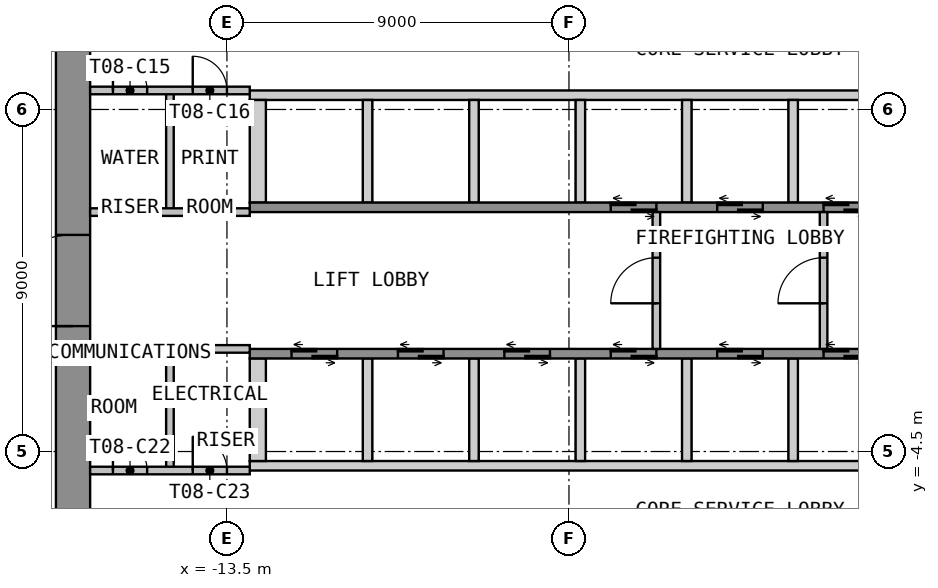
"""IFC4 building model, lengths in metres.
Left out: names, types, materials, properties, quantities, classifications, styles, units other than length and angle.
Written with IfcOpenShell. Run it as: python <this file> out.ifc"""

import sys

from ifc_helpers import new_model, si_unit, direction, frame, frame_2d, origin, place, context, subcontext, project, spatial, polyline, rectangle, outline, extrude, element, fill, save


model = new_model("IFC4")
c1 = context("Model", 3, precision=1e-05, world=origin(), true_north=direction((0.0, 1.0)))
c2 = subcontext(c1, "Body", "Model", "MODEL_VIEW")
j1 = project(units=[si_unit("LENGTHUNIT", "METRE"), si_unit("PLANEANGLEUNIT", "RADIAN")], contexts=[c1])
p1 = place(None, origin())
s1 = spatial("IfcSite", under=j1, at=p1, CompositionType="ELEMENT")
p2 = place(p1, origin())
s2 = spatial("IfcBuilding", under=s1, at=p2, CompositionType="ELEMENT")
p3 = place(p2, frame((0.0, 0.0, 116.4)))
s3 = spatial("IfcBuildingStorey", under=s2, at=p3, CompositionType="ELEMENT", Elevation=116.4)
p4 = place(p3, frame((-17.55, -12.6, 0.0), z_axis=(0.0, 0.0, 1.0), x_axis=(0.0, 1.0, 0.0)))
e1 = element("IfcWall", 1, at=p4, inside=s3, PredefinedType="SHEAR", context=c2, shape_type="SweptSolid", body=[
    extrude(rectangle(XDim=25.2, YDim=0.9, at=frame_2d((12.6, 0.0))), origin(), (0.0, 0.0, 1.0), 3.525),
])
p5 = place(p4, frame((11.4, 0.0, 0.0)))
e2 = element("IfcOpeningElement", 2, at=p5, cuts=e1, PredefinedType="OPENING", context=c2, shape_type="SweptSolid", body=[
    extrude(rectangle(XDim=2.4, YDim=2.1, at=frame_2d((1.2, 1.05))), frame((0.0, 0.46, 0.0), z_axis=(0.0, -1.0, 0.0), x_axis=(1.0, 0.0, 0.0)), (0.0, 0.0, 1.0), 0.92),
])
p6 = place(p3, origin())
e3 = element("IfcWall", 3, at=p6, inside=s3, PredefinedType="SHEAR", context=c2, shape_type="SweptSolid", body=[
    extrude(outline(polyline([(-12.9, 4.75), (12.9, 4.75), (12.9, 5.0), (-12.9, 5.0), (-12.9, 4.75)])), origin(), (0.0, 0.0, 1.0), 3.525),
])
p7 = place(p3, origin())
e4 = element("IfcWall", 4, at=p7, inside=s3, PredefinedType="SHEAR", context=c2, shape_type="SweptSolid", body=[
    extrude(outline(polyline([(-12.9, 2.05), (-12.475, 2.05), (-12.475, 4.75), (-12.9, 4.75), (-12.9, 2.05)])), origin(), (0.0, 0.0, 1.0), 3.525),
])
p8 = place(p3, origin())
e5 = element("IfcWall", 5, at=p8, inside=s3, PredefinedType="SHEAR", context=c2, shape_type="SweptSolid", body=[
    extrude(outline(polyline([(-9.925, 2.05), (-9.675, 2.05), (-9.675, 4.75), (-9.925, 4.75), (-9.925, 2.05)])), origin(), (0.0, 0.0, 1.0), 3.525),
])
p9 = place(p3, origin())
e6 = element("IfcWall", 6, at=p9, inside=s3, PredefinedType="SHEAR", context=c2, shape_type="SweptSolid", body=[
    extrude(outline(polyline([(-7.125, 2.05), (-6.875, 2.05), (-6.875, 4.75), (-7.125, 4.75), (-7.125, 2.05)])), origin(), (0.0, 0.0, 1.0), 3.525),
])
p10 = place(p3, origin())
e7 = element("IfcWall", 7, at=p10, inside=s3, PredefinedType="SHEAR", context=c2, shape_type="SweptSolid", body=[
    extrude(outline(polyline([(-4.325, 2.05), (-4.075, 2.05), (-4.075, 4.75), (-4.325, 4.75), (-4.325, 2.05)])), origin(), (0.0, 0.0, 1.0), 3.525),
])
p11 = place(p3, origin())
e8 = element("IfcWall", 8, at=p11, inside=s3, PredefinedType="SHEAR", context=c2, shape_type="SweptSolid", body=[
    extrude(outline(polyline([(-1.525, 2.05), (-1.275, 2.05), (-1.275, 4.75), (-1.525, 4.75), (-1.525, 2.05)])), origin(), (0.0, 0.0, 1.0), 3.525),
])
p12 = place(p3, origin())
e9 = element("IfcWall", 9, at=p12, inside=s3, PredefinedType="SHEAR", context=c2, shape_type="SweptSolid", body=[
    extrude(outline(polyline([(1.275, 2.05), (1.525, 2.05), (1.525, 4.75), (1.275, 4.75), (1.275, 2.05)])), origin(), (0.0, 0.0, 1.0), 3.525),
])
p13 = place(p3, frame((-12.9, 1.925, 0.0), z_axis=(0.0, 0.0, 1.0), x_axis=(1.0, 0.0, 0.0)))
e10 = element("IfcWall", 10, at=p13, inside=s3, PredefinedType="SHEAR", context=c2, shape_type="SweptSolid", body=[
    extrude(rectangle(XDim=25.8, YDim=0.25, at=frame_2d((12.9, 0.0))), origin(), (0.0, 0.0, 1.0), 3.525),
])
p14 = place(p13, frame((9.5, 0.0, 0.0)))
e11 = element("IfcOpeningElement", 11, at=p14, cuts=e10, PredefinedType="OPENING", context=c2, shape_type="SweptSolid", body=[
    extrude(rectangle(XDim=1.2, YDim=2.1, at=frame_2d((0.6, 1.05))), frame((0.0, 0.135, 0.0), z_axis=(0.0, -1.0, 0.0), x_axis=(1.0, 0.0, 0.0)), (0.0, 0.0, 1.0), 0.27),
])
p15 = place(p13, frame((12.3, 0.0, 0.0)))
e12 = element("IfcOpeningElement", 12, at=p15, cuts=e10, PredefinedType="OPENING", context=c2, shape_type="SweptSolid", body=[
    extrude(rectangle(XDim=1.2, YDim=2.1, at=frame_2d((0.6, 1.05))), frame((0.0, 0.135, 0.0), z_axis=(0.0, -1.0, 0.0), x_axis=(1.0, 0.0, 0.0)), (0.0, 0.0, 1.0), 0.27),
])
p16 = place(p13, frame((15.1, 0.0, 0.0)))
e13 = element("IfcOpeningElement", 13, at=p16, cuts=e10, PredefinedType="OPENING", context=c2, shape_type="SweptSolid", body=[
    extrude(rectangle(XDim=1.2, YDim=2.1, at=frame_2d((0.6, 1.05))), frame((0.0, 0.135, 0.0), z_axis=(0.0, -1.0, 0.0), x_axis=(1.0, 0.0, 0.0)), (0.0, 0.0, 1.0), 0.27),
])
p17 = place(p13, frame((17.9, 0.0, 0.0)))
e14 = element("IfcOpeningElement", 14, at=p17, cuts=e10, PredefinedType="OPENING", context=c2, shape_type="SweptSolid", body=[
    extrude(rectangle(XDim=1.2, YDim=2.1, at=frame_2d((0.6, 1.05))), frame((0.0, 0.135, 0.0), z_axis=(0.0, -1.0, 0.0), x_axis=(1.0, 0.0, 0.0)), (0.0, 0.0, 1.0), 0.27),
])
p18 = place(p13, frame((20.7, 0.0, 0.0)))
e15 = element("IfcOpeningElement", 15, at=p18, cuts=e10, PredefinedType="OPENING", context=c2, shape_type="SweptSolid", body=[
    extrude(rectangle(XDim=1.2, YDim=2.1, at=frame_2d((0.6, 1.05))), frame((0.0, 0.135, 0.0), z_axis=(0.0, -1.0, 0.0), x_axis=(1.0, 0.0, 0.0)), (0.0, 0.0, 1.0), 0.27),
])
p19 = place(p13, frame((23.5, 0.0, 0.0)))
e16 = element("IfcOpeningElement", 16, at=p19, cuts=e10, PredefinedType="OPENING", context=c2, shape_type="SweptSolid", body=[
    extrude(rectangle(XDim=1.2, YDim=2.1, at=frame_2d((0.6, 1.05))), frame((0.0, 0.135, 0.0), z_axis=(0.0, -1.0, 0.0), x_axis=(1.0, 0.0, 0.0)), (0.0, 0.0, 1.0), 0.27),
])
p20 = place(p3, origin())
e17 = element("IfcWall", 17, at=p20, inside=s3, PredefinedType="SHEAR", context=c2, shape_type="SweptSolid", body=[
    extrude(outline(polyline([(-12.9, -5.0), (12.9, -5.0), (12.9, -4.75), (-12.9, -4.75), (-12.9, -5.0)])), origin(), (0.0, 0.0, 1.0), 3.525),
])
p21 = place(p3, origin())
e18 = element("IfcWall", 18, at=p21, inside=s3, PredefinedType="SHEAR", context=c2, shape_type="SweptSolid", body=[
    extrude(outline(polyline([(-12.9, -4.75), (-12.475, -4.75), (-12.475, -2.05), (-12.9, -2.05), (-12.9, -4.75)])), origin(), (0.0, 0.0, 1.0), 3.525),
])
p22 = place(p3, origin())
e19 = element("IfcWall", 19, at=p22, inside=s3, PredefinedType="SHEAR", context=c2, shape_type="SweptSolid", body=[
    extrude(outline(polyline([(-9.925, -4.75), (-9.675, -4.75), (-9.675, -2.05), (-9.925, -2.05), (-9.925, -4.75)])), origin(), (0.0, 0.0, 1.0), 3.525),
])
p23 = place(p3, origin())
e20 = element("IfcWall", 20, at=p23, inside=s3, PredefinedType="SHEAR", context=c2, shape_type="SweptSolid", body=[
    extrude(outline(polyline([(-7.125, -4.75), (-6.875, -4.75), (-6.875, -2.05), (-7.125, -2.05), (-7.125, -4.75)])), origin(), (0.0, 0.0, 1.0), 3.525),
])
p24 = place(p3, origin())
e21 = element("IfcWall", 21, at=p24, inside=s3, PredefinedType="SHEAR", context=c2, shape_type="SweptSolid", body=[
    extrude(outline(polyline([(-4.325, -4.75), (-4.075, -4.75), (-4.075, -2.05), (-4.325, -2.05), (-4.325, -4.75)])), origin(), (0.0, 0.0, 1.0), 3.525),
])
p25 = place(p3, origin())
e22 = element("IfcWall", 22, at=p25, inside=s3, PredefinedType="SHEAR", context=c2, shape_type="SweptSolid", body=[
    extrude(outline(polyline([(-1.525, -4.75), (-1.275, -4.75), (-1.275, -2.05), (-1.525, -2.05), (-1.525, -4.75)])), origin(), (0.0, 0.0, 1.0), 3.525),
])
p26 = place(p3, origin())
e23 = element("IfcWall", 23, at=p26, inside=s3, PredefinedType="SHEAR", context=c2, shape_type="SweptSolid", body=[
    extrude(outline(polyline([(1.275, -4.75), (1.525, -4.75), (1.525, -2.05), (1.275, -2.05), (1.275, -4.75)])), origin(), (0.0, 0.0, 1.0), 3.525),
])
p27 = place(p3, frame((-12.9, -1.925, 0.0), z_axis=(0.0, 0.0, 1.0), x_axis=(1.0, 0.0, 0.0)))
e24 = element("IfcWall", 24, at=p27, inside=s3, PredefinedType="SHEAR", context=c2, shape_type="SweptSolid", body=[
    extrude(rectangle(XDim=25.8, YDim=0.25, at=frame_2d((12.9, 0.0))), origin(), (0.0, 0.0, 1.0), 3.525),
])
p28 = place(p27, frame((1.1, 0.0, 0.0)))
e25 = element("IfcOpeningElement", 25, at=p28, cuts=e24, PredefinedType="OPENING", context=c2, shape_type="SweptSolid", body=[
    extrude(rectangle(XDim=1.2, YDim=2.1, at=frame_2d((0.6, 1.05))), frame((0.0, 0.135, 0.0), z_axis=(0.0, -1.0, 0.0), x_axis=(1.0, 0.0, 0.0)), (0.0, 0.0, 1.0), 0.27),
])
p29 = place(p27, frame((3.9, 0.0, 0.0)))
e26 = element("IfcOpeningElement", 26, at=p29, cuts=e24, PredefinedType="OPENING", context=c2, shape_type="SweptSolid", body=[
    extrude(rectangle(XDim=1.2, YDim=2.1, at=frame_2d((0.6, 1.05))), frame((0.0, 0.135, 0.0), z_axis=(0.0, -1.0, 0.0), x_axis=(1.0, 0.0, 0.0)), (0.0, 0.0, 1.0), 0.27),
])
p30 = place(p27, frame((6.7, 0.0, 0.0)))
e27 = element("IfcOpeningElement", 27, at=p30, cuts=e24, PredefinedType="OPENING", context=c2, shape_type="SweptSolid", body=[
    extrude(rectangle(XDim=1.2, YDim=2.1, at=frame_2d((0.6, 1.05))), frame((0.0, 0.135, 0.0), z_axis=(0.0, -1.0, 0.0), x_axis=(1.0, 0.0, 0.0)), (0.0, 0.0, 1.0), 0.27),
])
p31 = place(p27, frame((9.5, 0.0, 0.0)))
e28 = element("IfcOpeningElement", 28, at=p31, cuts=e24, PredefinedType="OPENING", context=c2, shape_type="SweptSolid", body=[
    extrude(rectangle(XDim=1.2, YDim=2.1, at=frame_2d((0.6, 1.05))), frame((0.0, 0.135, 0.0), z_axis=(0.0, -1.0, 0.0), x_axis=(1.0, 0.0, 0.0)), (0.0, 0.0, 1.0), 0.27),
])
p32 = place(p27, frame((12.3, 0.0, 0.0)))
e29 = element("IfcOpeningElement", 29, at=p32, cuts=e24, PredefinedType="OPENING", context=c2, shape_type="SweptSolid", body=[
    extrude(rectangle(XDim=1.2, YDim=2.1, at=frame_2d((0.6, 1.05))), frame((0.0, 0.135, 0.0), z_axis=(0.0, -1.0, 0.0), x_axis=(1.0, 0.0, 0.0)), (0.0, 0.0, 1.0), 0.27),
])
p33 = place(p27, frame((15.1, 0.0, 0.0)))
e30 = element("IfcOpeningElement", 30, at=p33, cuts=e24, PredefinedType="OPENING", context=c2, shape_type="SweptSolid", body=[
    extrude(rectangle(XDim=1.2, YDim=2.1, at=frame_2d((0.6, 1.05))), frame((0.0, 0.135, 0.0), z_axis=(0.0, -1.0, 0.0), x_axis=(1.0, 0.0, 0.0)), (0.0, 0.0, 1.0), 0.27),
])
p34 = place(p3, frame((-2.2, -1.8, 0.0), z_axis=(0.0, 0.0, 1.0), x_axis=(0.0, 1.0, 0.0)))
e31 = element("IfcWall", 31, at=p34, inside=s3, PredefinedType="PARTITIONING", context=c2, shape_type="SweptSolid", body=[
    extrude(rectangle(XDim=3.6, YDim=0.2, at=frame_2d((1.8, 0.0))), origin(), (0.0, 0.0, 1.0), 3.525),
])
p35 = place(p34, frame((1.2, 0.0, 0.0)))
e32 = element("IfcOpeningElement", 32, at=p35, cuts=e31, PredefinedType="OPENING", context=c2, shape_type="SweptSolid", body=[
    extrude(rectangle(XDim=1.2, YDim=2.1, at=frame_2d((0.6, 1.05))), frame((0.0, 0.11, 0.0), z_axis=(0.0, -1.0, 0.0), x_axis=(1.0, 0.0, 0.0)), (0.0, 0.0, 1.0), 0.22),
])
p36 = place(p3, frame((2.2, -1.8, 0.0), z_axis=(0.0, 0.0, 1.0), x_axis=(0.0, 1.0, 0.0)))
e33 = element("IfcWall", 33, at=p36, inside=s3, PredefinedType="PARTITIONING", context=c2, shape_type="SweptSolid", body=[
    extrude(rectangle(XDim=3.6, YDim=0.2, at=frame_2d((1.8, 0.0))), origin(), (0.0, 0.0, 1.0), 3.525),
])
p37 = place(p36, frame((1.2, 0.0, 0.0)))
e34 = element("IfcOpeningElement", 34, at=p37, cuts=e33, PredefinedType="OPENING", context=c2, shape_type="SweptSolid", body=[
    extrude(rectangle(XDim=1.2, YDim=2.1, at=frame_2d((0.6, 1.05))), frame((0.0, 0.11, 0.0), z_axis=(0.0, -1.0, 0.0), x_axis=(1.0, 0.0, 0.0)), (0.0, 0.0, 1.0), 0.22),
])
p38 = place(p3, frame((-15.0, 1.8, 0.0), z_axis=(0.0, 0.0, 1.0), x_axis=(0.0, 1.0, 0.0)))
e35 = element("IfcWall", 35, at=p38, inside=s3, PredefinedType="PARTITIONING", context=c2, shape_type="SweptSolid", body=[
    extrude(rectangle(XDim=3.2, YDim=0.2, at=frame_2d((1.6, 0.0))), origin(), (0.0, 0.0, 1.0), 3.525),
])
p39 = place(p3, frame((-17.1, 5.0, 0.0), z_axis=(0.0, 0.0, 1.0), x_axis=(1.0, 0.0, 0.0)))
e36 = element("IfcWall", 36, at=p39, inside=s3, PredefinedType="PARTITIONING", context=c2, shape_type="SweptSolid", body=[
    extrude(rectangle(XDim=4.2, YDim=0.2, at=frame_2d((2.1, 0.0))), origin(), (0.0, 0.0, 1.0), 3.525),
])
p40 = place(p39, frame((0.6, 0.0, 0.0)))
e37 = element("IfcOpeningElement", 37, at=p40, cuts=e36, PredefinedType="OPENING", context=c2, shape_type="SweptSolid", body=[
    extrude(rectangle(XDim=0.9, YDim=2.1, at=frame_2d((0.45, 1.05))), frame((0.0, 0.11, 0.0), z_axis=(0.0, -1.0, 0.0), x_axis=(1.0, 0.0, 0.0)), (0.0, 0.0, 1.0), 0.22),
])
p41 = place(p39, frame((2.7, 0.0, 0.0)))
e38 = element("IfcOpeningElement", 38, at=p41, cuts=e36, PredefinedType="OPENING", context=c2, shape_type="SweptSolid", body=[
    extrude(rectangle(XDim=0.9, YDim=2.1, at=frame_2d((0.45, 1.05))), frame((0.0, 0.11, 0.0), z_axis=(0.0, -1.0, 0.0), x_axis=(1.0, 0.0, 0.0)), (0.0, 0.0, 1.0), 0.22),
])
p42 = place(p3, frame((-17.1, 1.8, 0.0), z_axis=(0.0, 0.0, 1.0), x_axis=(1.0, 0.0, 0.0)))
e39 = element("IfcWall", 39, at=p42, inside=s3, PredefinedType="PARTITIONING", context=c2, shape_type="SweptSolid", body=[
    extrude(rectangle(XDim=4.2, YDim=0.2, at=frame_2d((2.1, 0.0))), origin(), (0.0, 0.0, 1.0), 3.525),
])
p43 = place(p3, frame((-15.0, -5.0, 0.0), z_axis=(0.0, 0.0, 1.0), x_axis=(0.0, 1.0, 0.0)))
e40 = element("IfcWall", 40, at=p43, inside=s3, PredefinedType="PARTITIONING", context=c2, shape_type="SweptSolid", body=[
    extrude(rectangle(XDim=3.2, YDim=0.2, at=frame_2d((1.6, 0.0))), origin(), (0.0, 0.0, 1.0), 3.525),
])
p44 = place(p3, frame((-17.1, -5.0, 0.0), z_axis=(0.0, 0.0, 1.0), x_axis=(1.0, 0.0, 0.0)))
e41 = element("IfcWall", 41, at=p44, inside=s3, PredefinedType="PARTITIONING", context=c2, shape_type="SweptSolid", body=[
    extrude(rectangle(XDim=4.2, YDim=0.2, at=frame_2d((2.1, 0.0))), origin(), (0.0, 0.0, 1.0), 3.525),
])
p45 = place(p44, frame((0.6, 0.0, 0.0)))
e42 = element("IfcOpeningElement", 42, at=p45, cuts=e41, PredefinedType="OPENING", context=c2, shape_type="SweptSolid", body=[
    extrude(rectangle(XDim=0.9, YDim=2.1, at=frame_2d((0.45, 1.05))), frame((0.0, 0.11, 0.0), z_axis=(0.0, -1.0, 0.0), x_axis=(1.0, 0.0, 0.0)), (0.0, 0.0, 1.0), 0.22),
])
p46 = place(p44, frame((2.7, 0.0, 0.0)))
e43 = element("IfcOpeningElement", 43, at=p46, cuts=e41, PredefinedType="OPENING", context=c2, shape_type="SweptSolid", body=[
    extrude(rectangle(XDim=0.9, YDim=2.1, at=frame_2d((0.45, 1.05))), frame((0.0, 0.11, 0.0), z_axis=(0.0, -1.0, 0.0), x_axis=(1.0, 0.0, 0.0)), (0.0, 0.0, 1.0), 0.22),
])
p47 = place(p3, frame((-17.1, -1.8, 0.0), z_axis=(0.0, 0.0, 1.0), x_axis=(1.0, 0.0, 0.0)))
e44 = element("IfcWall", 44, at=p47, inside=s3, PredefinedType="PARTITIONING", context=c2, shape_type="SweptSolid", body=[
    extrude(rectangle(XDim=4.2, YDim=0.2, at=frame_2d((2.1, 0.0))), origin(), (0.0, 0.0, 1.0), 3.525),
])
p48 = place(p5, origin())
e45 = element("IfcDoor", 45, at=p48, inside=s3, OperationType="DOUBLE_DOOR_DOUBLE_SWING", PredefinedType="DOOR", context=c2, shape_type="SweptSolid", body=[
    extrude(rectangle(XDim=2.4, YDim=2.1, at=frame_2d((1.2, 1.05))), frame((0.0, 0.025, 0.0), z_axis=(0.0, -1.0, 0.0), x_axis=(1.0, 0.0, 0.0)), (0.0, 0.0, 1.0), 0.05),
])
fill(e2, e45)
p49 = place(p14, origin())
e46 = element("IfcDoor", 46, at=p49, inside=s3, OperationType="DOUBLE_DOOR_SLIDING", PredefinedType="DOOR", context=c2, shape_type="SweptSolid", body=[
    extrude(rectangle(XDim=1.2, YDim=2.1, at=frame_2d((0.6, 1.05))), frame((0.0, 0.025, 0.0), z_axis=(0.0, -1.0, 0.0), x_axis=(1.0, 0.0, 0.0)), (0.0, 0.0, 1.0), 0.05),
])
fill(e11, e46)
p50 = place(p15, origin())
e47 = element("IfcDoor", 47, at=p50, inside=s3, OperationType="DOUBLE_DOOR_SLIDING", PredefinedType="DOOR", context=c2, shape_type="SweptSolid", body=[
    extrude(rectangle(XDim=1.2, YDim=2.1, at=frame_2d((0.6, 1.05))), frame((0.0, 0.025, 0.0), z_axis=(0.0, -1.0, 0.0), x_axis=(1.0, 0.0, 0.0)), (0.0, 0.0, 1.0), 0.05),
])
fill(e12, e47)
p51 = place(p16, origin())
e48 = element("IfcDoor", 48, at=p51, inside=s3, OperationType="DOUBLE_DOOR_SLIDING", PredefinedType="DOOR", context=c2, shape_type="SweptSolid", body=[
    extrude(rectangle(XDim=1.2, YDim=2.1, at=frame_2d((0.6, 1.05))), frame((0.0, 0.025, 0.0), z_axis=(0.0, -1.0, 0.0), x_axis=(1.0, 0.0, 0.0)), (0.0, 0.0, 1.0), 0.05),
])
fill(e13, e48)
p52 = place(p28, origin())
e49 = element("IfcDoor", 49, at=p52, inside=s3, OperationType="DOUBLE_DOOR_SLIDING", PredefinedType="DOOR", context=c2, shape_type="SweptSolid", body=[
    extrude(rectangle(XDim=1.2, YDim=2.1, at=frame_2d((0.6, 1.05))), frame((0.0, 0.025, 0.0), z_axis=(0.0, -1.0, 0.0), x_axis=(1.0, 0.0, 0.0)), (0.0, 0.0, 1.0), 0.05),
])
fill(e25, e49)
p53 = place(p29, origin())
e50 = element("IfcDoor", 50, at=p53, inside=s3, OperationType="DOUBLE_DOOR_SLIDING", PredefinedType="DOOR", context=c2, shape_type="SweptSolid", body=[
    extrude(rectangle(XDim=1.2, YDim=2.1, at=frame_2d((0.6, 1.05))), frame((0.0, 0.025, 0.0), z_axis=(0.0, -1.0, 0.0), x_axis=(1.0, 0.0, 0.0)), (0.0, 0.0, 1.0), 0.05),
])
fill(e26, e50)
p54 = place(p30, origin())
e51 = element("IfcDoor", 51, at=p54, inside=s3, OperationType="DOUBLE_DOOR_SLIDING", PredefinedType="DOOR", context=c2, shape_type="SweptSolid", body=[
    extrude(rectangle(XDim=1.2, YDim=2.1, at=frame_2d((0.6, 1.05))), frame((0.0, 0.025, 0.0), z_axis=(0.0, -1.0, 0.0), x_axis=(1.0, 0.0, 0.0)), (0.0, 0.0, 1.0), 0.05),
])
fill(e27, e51)
p55 = place(p31, origin())
e52 = element("IfcDoor", 52, at=p55, inside=s3, OperationType="DOUBLE_DOOR_SLIDING", PredefinedType="DOOR", context=c2, shape_type="SweptSolid", body=[
    extrude(rectangle(XDim=1.2, YDim=2.1, at=frame_2d((0.6, 1.05))), frame((0.0, 0.025, 0.0), z_axis=(0.0, -1.0, 0.0), x_axis=(1.0, 0.0, 0.0)), (0.0, 0.0, 1.0), 0.05),
])
fill(e28, e52)
p56 = place(p32, origin())
e53 = element("IfcDoor", 53, at=p56, inside=s3, OperationType="DOUBLE_DOOR_SLIDING", PredefinedType="DOOR", context=c2, shape_type="SweptSolid", body=[
    extrude(rectangle(XDim=1.2, YDim=2.1, at=frame_2d((0.6, 1.05))), frame((0.0, 0.025, 0.0), z_axis=(0.0, -1.0, 0.0), x_axis=(1.0, 0.0, 0.0)), (0.0, 0.0, 1.0), 0.05),
])
fill(e29, e53)
p57 = place(p33, origin())
e54 = element("IfcDoor", 54, at=p57, inside=s3, OperationType="DOUBLE_DOOR_SLIDING", PredefinedType="DOOR", context=c2, shape_type="SweptSolid", body=[
    extrude(rectangle(XDim=1.2, YDim=2.1, at=frame_2d((0.6, 1.05))), frame((0.0, 0.025, 0.0), z_axis=(0.0, -1.0, 0.0), x_axis=(1.0, 0.0, 0.0)), (0.0, 0.0, 1.0), 0.05),
])
fill(e30, e54)
p58 = place(p35, origin())
e55 = element("IfcDoor", 55, at=p58, inside=s3, OperationType="SINGLE_SWING_LEFT", PredefinedType="DOOR", context=c2, shape_type="SweptSolid", body=[
    extrude(rectangle(XDim=1.2, YDim=2.1, at=frame_2d((0.6, 1.05))), frame((0.0, 0.025, 0.0), z_axis=(0.0, -1.0, 0.0), x_axis=(1.0, 0.0, 0.0)), (0.0, 0.0, 1.0), 0.05),
])
fill(e32, e55)
p59 = place(p37, origin())
e56 = element("IfcDoor", 56, at=p59, inside=s3, OperationType="SINGLE_SWING_LEFT", PredefinedType="DOOR", context=c2, shape_type="SweptSolid", body=[
    extrude(rectangle(XDim=1.2, YDim=2.1, at=frame_2d((0.6, 1.05))), frame((0.0, 0.025, 0.0), z_axis=(0.0, -1.0, 0.0), x_axis=(1.0, 0.0, 0.0)), (0.0, 0.0, 1.0), 0.05),
])
fill(e34, e56)
p60 = place(p40, origin())
e57 = element("IfcDoor", 57, at=p60, inside=s3, OperationType="SINGLE_SWING_LEFT", PredefinedType="DOOR", context=c2, shape_type="SweptSolid", body=[
    extrude(rectangle(XDim=0.9, YDim=2.1, at=frame_2d((0.45, 1.05))), frame((0.0, 0.025, 0.0), z_axis=(0.0, -1.0, 0.0), x_axis=(1.0, 0.0, 0.0)), (0.0, 0.0, 1.0), 0.05),
])
fill(e37, e57)
p61 = place(p41, origin())
e58 = element("IfcDoor", 58, at=p61, inside=s3, OperationType="SINGLE_SWING_LEFT", PredefinedType="DOOR", context=c2, shape_type="SweptSolid", body=[
    extrude(rectangle(XDim=0.9, YDim=2.1, at=frame_2d((0.45, 1.05))), frame((0.0, 0.025, 0.0), z_axis=(0.0, -1.0, 0.0), x_axis=(1.0, 0.0, 0.0)), (0.0, 0.0, 1.0), 0.05),
])
fill(e38, e58)
p62 = place(p45, origin())
e59 = element("IfcDoor", 59, at=p62, inside=s3, OperationType="SINGLE_SWING_LEFT", PredefinedType="DOOR", context=c2, shape_type="SweptSolid", body=[
    extrude(rectangle(XDim=0.9, YDim=2.1, at=frame_2d((0.45, 1.05))), frame((0.0, 0.025, 0.0), z_axis=(0.0, -1.0, 0.0), x_axis=(1.0, 0.0, 0.0)), (0.0, 0.0, 1.0), 0.05),
])
fill(e42, e59)
p63 = place(p46, origin())
e60 = element("IfcDoor", 60, at=p63, inside=s3, OperationType="SINGLE_SWING_LEFT", PredefinedType="DOOR", context=c2, shape_type="SweptSolid", body=[
    extrude(rectangle(XDim=0.9, YDim=2.1, at=frame_2d((0.45, 1.05))), frame((0.0, 0.025, 0.0), z_axis=(0.0, -1.0, 0.0), x_axis=(1.0, 0.0, 0.0)), (0.0, 0.0, 1.0), 0.05),
])
fill(e43, e60)
save(model, sys.argv[1])
